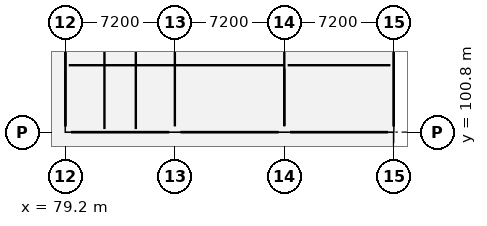
"""IFC4 building model, lengths in metres.
Left out: names, types, materials, properties, quantities, classifications, styles, units other than length and angle.
Written with IfcOpenShell. Run it as: python <this file> out.ifc"""

import sys

from ifc_helpers import new_model, si_unit, direction, frame, frame_2d, origin, origin_2d, place, context, subcontext, project, spatial, rectangle, extrude, element, fill, save


model = new_model("IFC4")
c1 = context("Model", 3, precision=1e-05, world=origin(), true_north=direction((0.0, 1.0)))
c2 = subcontext(c1, "Body", "Model", "MODEL_VIEW")
j1 = project(units=[si_unit("LENGTHUNIT", "METRE"), si_unit("PLANEANGLEUNIT", "RADIAN")], contexts=[c1])
p1 = place(None, origin())
s1 = spatial("IfcSite", under=j1, at=p1, CompositionType="ELEMENT")
p2 = place(p1, origin())
s2 = spatial("IfcBuilding", under=s1, at=p2, CompositionType="ELEMENT")
p3 = place(p2, frame((0.0, 0.0, 5.4)))
s3 = spatial("IfcBuildingStorey", under=s2, at=p3, CompositionType="ELEMENT", Elevation=5.4)
for number, where, z_axis, x_axis in (
    (1, (79.2, 100.8, 0.0), (0.0, 0.0, 1.0), (1.0, 0.0, 0.0)),
    (2, (86.4, 100.8, 0.0), (0.0, 0.0, 1.0), (1.0, 0.0, 0.0)),
    (3, (93.6, 100.8, 0.0), (0.0, 0.0, 1.0), (1.0, 0.0, 0.0)),
    (4, (100.8, 100.8, 0.0), (0.0, 0.0, 1.0), (1.0, 0.0, 0.0)),
):
    element("IfcColumn", number, at=place(p3, frame(where, z_axis=z_axis, x_axis=x_axis)), inside=s3, PredefinedType="COLUMN", context=c2, shape_type="SweptSolid", body=[
        extrude(rectangle(XDim=0.75, YDim=0.75, at=origin_2d()), origin(), (0.0, 0.0, 1.0), 4.2),
    ])
for number, where, z_axis, x_axis in (
    (5, (100.8, 101.175, 0.0), (0.0, 0.0, 1.0), (0.0, 1.0, 0.0)),
    (6, (79.2, 107.625, 0.0), (0.0, 0.0, 1.0), (0.0, -1.0, 0.0)),
):
    element("IfcWall", number, at=place(p3, frame(where, z_axis=z_axis, x_axis=x_axis)), inside=s3, PredefinedType="ELEMENTEDWALL", context=c2, shape_type="SweptSolid", body=[
        extrude(rectangle(XDim=6.45, YDim=0.32, at=frame_2d((3.225, 0.0))), origin(), (0.0, 0.0, 1.0), 3.34),
    ])
p4 = place(p3, frame((79.575, 100.8, 0.0), z_axis=(0.0, 0.0, 1.0), x_axis=(1.0, 0.0, 0.0)))
e7 = element("IfcWall", 7, at=p4, inside=s3, PredefinedType="ELEMENTEDWALL", context=c2, shape_type="SweptSolid", body=[
    extrude(rectangle(XDim=6.45, YDim=0.32, at=frame_2d((3.225, 0.0))), origin(), (0.0, 0.0, 1.0), 3.19),
])
p5 = place(p4, frame((2.4, 0.0, 0.85)))
e8 = element("IfcOpeningElement", 8, at=p5, cuts=e7, PredefinedType="OPENING", context=c2, shape_type="SweptSolid", body=[
    extrude(rectangle(XDim=1.65, YDim=1.9, at=frame_2d((0.825, 0.95))), frame((0.0, 0.172, 0.0), z_axis=(0.0, -1.0, 0.0), x_axis=(1.0, 0.0, 0.0)), (0.0, 0.0, 1.0), 0.344),
])
p6 = place(p3, frame((86.775, 100.8, 0.0), z_axis=(0.0, 0.0, 1.0), x_axis=(1.0, 0.0, 0.0)))
e9 = element("IfcWall", 9, at=p6, inside=s3, PredefinedType="ELEMENTEDWALL", context=c2, shape_type="SweptSolid", body=[
    extrude(rectangle(XDim=6.45, YDim=0.32, at=frame_2d((3.225, 0.0))), origin(), (0.0, 0.0, 1.0), 3.24),
])
p7 = place(p6, frame((2.225, 0.0, 0.85)))
e10 = element("IfcOpeningElement", 10, at=p7, cuts=e9, PredefinedType="OPENING", context=c2, shape_type="SweptSolid", body=[
    extrude(rectangle(XDim=2.0, YDim=1.85, at=frame_2d((1.0, 0.925))), frame((0.0, 0.172, 0.0), z_axis=(0.0, -1.0, 0.0), x_axis=(1.0, 0.0, 0.0)), (0.0, 0.0, 1.0), 0.344),
])
p8 = place(p3, frame((93.975, 100.8, 0.0), z_axis=(0.0, 0.0, 1.0), x_axis=(1.0, 0.0, 0.0)))
e11 = element("IfcWall", 11, at=p8, inside=s3, PredefinedType="ELEMENTEDWALL", context=c2, shape_type="SweptSolid", body=[
    extrude(rectangle(XDim=6.45, YDim=0.32, at=frame_2d((3.225, 0.0))), origin(), (0.0, 0.0, 1.0), 3.19),
])
p9 = place(p8, frame((2.775, 0.0, 0.8)))
e12 = element("IfcOpeningElement", 12, at=p9, cuts=e11, PredefinedType="OPENING", context=c2, shape_type="SweptSolid", body=[
    extrude(rectangle(XDim=0.9, YDim=2.0, at=frame_2d((0.45, 1.0))), frame((0.0, 0.172, 0.0), z_axis=(0.0, -1.0, 0.0), x_axis=(1.0, 0.0, 0.0)), (0.0, 0.0, 1.0), 0.344),
])
p10 = place(p3, frame((79.42, 105.2, 0.0), z_axis=(0.0, 0.0, 1.0), x_axis=(1.0, 0.0, 0.0)))
e13 = element("IfcWall", 13, at=p10, inside=s3, PredefinedType="PARTITIONING", context=c2, shape_type="SweptSolid", body=[
    extrude(rectangle(XDim=14.18, YDim=0.12, at=frame_2d((7.09, 0.0))), origin(), (0.0, 0.0, 1.0), 3.338),
])
p11 = place(p10, frame((6.59, 0.0, 0.0)))
e14 = element("IfcOpeningElement", 14, at=p11, cuts=e13, PredefinedType="OPENING", context=c2, shape_type="SweptSolid", body=[
    extrude(rectangle(XDim=1.0, YDim=2.15, at=frame_2d((0.5, 1.075))), frame((0.0, 0.072, 0.0), z_axis=(0.0, -1.0, 0.0), x_axis=(1.0, 0.0, 0.0)), (0.0, 0.0, 1.0), 0.144),
])
p12 = place(p3, frame((93.6, 101.215, 0.0), z_axis=(0.0, 0.0, 1.0), x_axis=(0.0, 1.0, 0.0)))
e15 = element("IfcWall", 15, at=p12, inside=s3, PredefinedType="PARTITIONING", context=c2, shape_type="SweptSolid", body=[
    extrude(rectangle(XDim=3.765, YDim=0.12, at=frame_2d((1.882, 0.0))), origin(), (0.0, 0.0, 1.0), 3.338),
])
p13 = place(p3, frame((93.82, 105.2, 0.0), z_axis=(0.0, 0.0, 1.0), x_axis=(1.0, 0.0, 0.0)))
e16 = element("IfcWall", 16, at=p13, inside=s3, PredefinedType="PLUMBINGWALL", context=c2, shape_type="SweptSolid", body=[
    extrude(rectangle(XDim=6.76, YDim=0.18, at=frame_2d((3.38, 0.0))), origin(), (0.0, 0.0, 1.0), 3.92),
])
p14 = place(p13, frame((2.93, 0.0, 0.0)))
e17 = element("IfcOpeningElement", 17, at=p14, cuts=e16, PredefinedType="OPENING", context=c2, shape_type="SweptSolid", body=[
    extrude(rectangle(XDim=0.9, YDim=2.1, at=frame_2d((0.45, 1.05))), frame((0.0, 0.102, 0.0), z_axis=(0.0, -1.0, 0.0), x_axis=(1.0, 0.0, 0.0)), (0.0, 0.0, 1.0), 0.204),
])
p15 = place(p5, origin())
e18 = element("IfcWindow", 18, at=p15, inside=s3, PartitioningType="SINGLE_PANEL", PredefinedType="WINDOW", context=c2, shape_type="SweptSolid", body=[
    extrude(rectangle(XDim=1.65, YDim=1.9, at=frame_2d((0.825, 0.95))), frame((0.0, 0.03, 0.0), z_axis=(0.0, -1.0, 0.0), x_axis=(1.0, 0.0, 0.0)), (0.0, 0.0, 1.0), 0.06),
])
fill(e8, e18)
p16 = place(p7, origin())
e19 = element("IfcWindow", 19, at=p16, inside=s3, PartitioningType="SINGLE_PANEL", PredefinedType="WINDOW", context=c2, shape_type="SweptSolid", body=[
    extrude(rectangle(XDim=2.0, YDim=1.85, at=frame_2d((1.0, 0.925))), frame((0.0, 0.03, 0.0), z_axis=(0.0, -1.0, 0.0), x_axis=(1.0, 0.0, 0.0)), (0.0, 0.0, 1.0), 0.06),
])
fill(e10, e19)
p17 = place(p9, origin())
e20 = element("IfcWindow", 20, at=p17, inside=s3, PartitioningType="SINGLE_PANEL", PredefinedType="WINDOW", context=c2, shape_type="SweptSolid", body=[
    extrude(rectangle(XDim=0.9, YDim=2.0, at=frame_2d((0.45, 1.0))), frame((0.0, 0.03, 0.0), z_axis=(0.0, -1.0, 0.0), x_axis=(1.0, 0.0, 0.0)), (0.0, 0.0, 1.0), 0.06),
])
fill(e12, e20)
p18 = place(p11, origin())
e21 = element("IfcDoor", 21, at=p18, inside=s3, OperationType="SINGLE_SWING_RIGHT", PredefinedType="DOOR", context=c2, shape_type="SweptSolid", body=[
    extrude(rectangle(XDim=1.0, YDim=2.15, at=frame_2d((0.5, 1.075))), frame((0.0, 0.025, 0.0), z_axis=(0.0, -1.0, 0.0), x_axis=(1.0, 0.0, 0.0)), (0.0, 0.0, 1.0), 0.05),
])
fill(e14, e21)
p19 = place(p14, origin())
e22 = element("IfcDoor", 22, at=p19, inside=s3, OperationType="SINGLE_SWING_LEFT", PredefinedType="DOOR", context=c2, shape_type="SweptSolid", body=[
    extrude(rectangle(XDim=0.9, YDim=2.1, at=frame_2d((0.45, 1.05))), frame((0.0, 0.025, 0.0), z_axis=(0.0, -1.0, 0.0), x_axis=(1.0, 0.0, 0.0)), (0.0, 0.0, 1.0), 0.05),
])
fill(e17, e22)
save(model, sys.argv[1])
